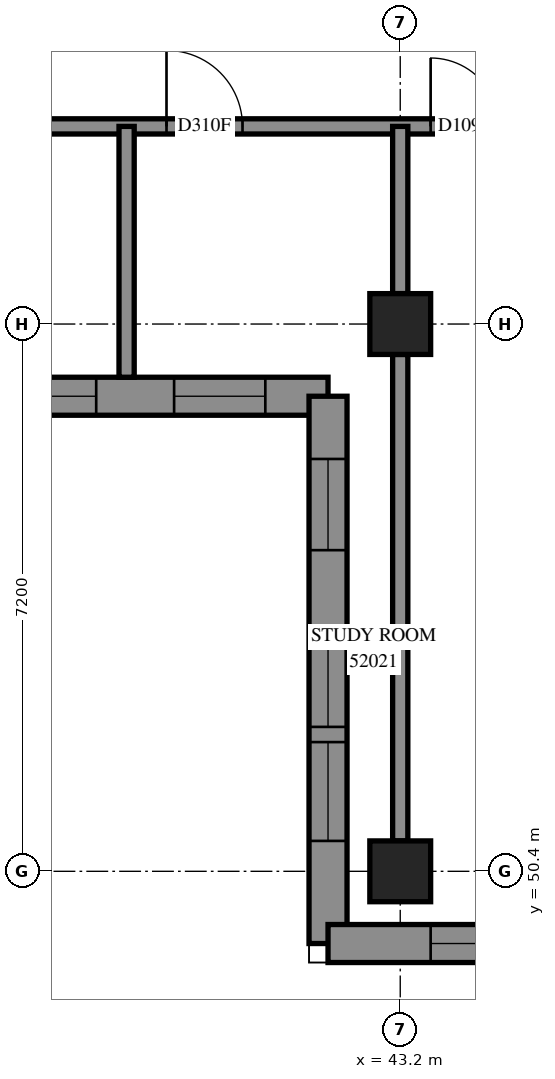
"""IFC4 building model, lengths in metres.
Left out: names, types, materials, properties, quantities, classifications, styles, units other than length and angle.
Written with IfcOpenShell. Run it as: python <this file> out.ifc"""

import sys

from ifc_helpers import new_model, si_unit, direction, frame, frame_2d, origin, origin_2d, place, context, subcontext, project, spatial, polyline, rectangle, outline, extrude, element, fill, save


model = new_model("IFC4")
c1 = context("Model", 3, precision=1e-05, world=origin(), true_north=direction((0.0, 1.0)))
c2 = subcontext(c1, "Body", "Model", "MODEL_VIEW")
j1 = project(units=[si_unit("LENGTHUNIT", "METRE"), si_unit("PLANEANGLEUNIT", "RADIAN")], contexts=[c1])
p1 = place(None, origin())
s1 = spatial("IfcSite", under=j1, at=p1, CompositionType="ELEMENT")
p2 = place(p1, origin())
s2 = spatial("IfcBuilding", under=s1, at=p2, CompositionType="ELEMENT")
p3 = place(p2, frame((0.0, 0.0, 193.0)))
s3 = spatial("IfcBuildingStorey", under=s2, at=p3, CompositionType="ELEMENT", Elevation=193.0)
for number, where, z_axis, x_axis in (
    (1, (43.2, 50.4, 0.0), (0.0, 0.0, 1.0), (1.0, 0.0, 0.0)),
    (2, (43.2, 57.6, 0.0), (0.0, 0.0, 1.0), (1.0, 0.0, 0.0)),
):
    element("IfcColumn", number, at=place(p3, frame(where, z_axis=z_axis, x_axis=x_axis)), inside=s3, PredefinedType="COLUMN", context=c2, shape_type="SweptSolid", body=[
        extrude(rectangle(XDim=0.8, YDim=0.8, at=origin_2d()), origin(), (0.0, 0.0, 1.0), 3.1),
    ])
p4 = place(p3, frame((35.05, 56.65, 0.0), z_axis=(0.0, 0.0, 1.0), x_axis=(1.0, 0.0, 0.0)))
e3 = element("IfcWall", 3, at=p4, inside=s3, PredefinedType="SOLIDWALL", context=c2, shape_type="SweptSolid", body=[
    extrude(outline(polyline([(-0.25, -0.25), (6.95, -0.25), (7.45, 0.25), (0.25, 0.25), (-0.25, -0.25)])), origin(), (0.0, 0.0, 1.0), 3.1),
])
p5 = place(p4, frame((1.35, 0.0, 0.45)))
e4 = element("IfcOpeningElement", 4, at=p5, cuts=e3, PredefinedType="OPENING", context=c2, shape_type="SweptSolid", body=[
    extrude(rectangle(XDim=1.3, YDim=2.5, at=frame_2d((0.65, 1.25))), frame((0.0, 0.26, 0.0), z_axis=(0.0, -1.0, 0.0), x_axis=(1.0, 0.0, 0.0)), (0.0, 0.0, 1.0), 0.52),
])
p6 = place(p4, frame((2.85, 0.0, 0.45)))
e5 = element("IfcOpeningElement", 5, at=p6, cuts=e3, PredefinedType="OPENING", context=c2, shape_type="SweptSolid", body=[
    extrude(rectangle(XDim=1.3, YDim=2.5, at=frame_2d((0.65, 1.25))), frame((0.0, 0.26, 0.0), z_axis=(0.0, -1.0, 0.0), x_axis=(1.0, 0.0, 0.0)), (0.0, 0.0, 1.0), 0.52),
])
p7 = place(p4, frame((5.175, 0.0, 0.45)))
e6 = element("IfcOpeningElement", 6, at=p7, cuts=e3, PredefinedType="OPENING", context=c2, shape_type="SweptSolid", body=[
    extrude(rectangle(XDim=1.2, YDim=2.5, at=frame_2d((0.6, 1.25))), frame((0.0, 0.26, 0.0), z_axis=(0.0, -1.0, 0.0), x_axis=(1.0, 0.0, 0.0)), (0.0, 0.0, 1.0), 0.52),
])
p8 = place(p3, frame((42.25, 56.65, 0.0), z_axis=(0.0, 0.0, 1.0), x_axis=(0.0, -1.0, 0.0)))
e7 = element("IfcWall", 7, at=p8, inside=s3, PredefinedType="SOLIDWALL", context=c2, shape_type="SweptSolid", body=[
    extrude(outline(polyline([(0.25, -0.25), (7.45, -0.25), (6.95, 0.25), (-0.25, 0.25), (0.25, -0.25)])), origin(), (0.0, 0.0, 1.0), 3.1),
])
p9 = place(p8, frame((3.05, 0.0, 0.45)))
e8 = element("IfcOpeningElement", 8, at=p9, cuts=e7, PredefinedType="OPENING", context=c2, shape_type="SweptSolid", body=[
    extrude(rectangle(XDim=1.3, YDim=2.5, at=frame_2d((0.65, 1.25))), frame((0.0, 0.26, 0.0), z_axis=(0.0, -1.0, 0.0), x_axis=(1.0, 0.0, 0.0)), (0.0, 0.0, 1.0), 0.52),
])
p10 = place(p8, frame((4.55, 0.0, 0.45)))
e9 = element("IfcOpeningElement", 9, at=p10, cuts=e7, PredefinedType="OPENING", context=c2, shape_type="SweptSolid", body=[
    extrude(rectangle(XDim=1.3, YDim=2.5, at=frame_2d((0.65, 1.25))), frame((0.0, 0.26, 0.0), z_axis=(0.0, -1.0, 0.0), x_axis=(1.0, 0.0, 0.0)), (0.0, 0.0, 1.0), 0.52),
])
p11 = place(p8, frame((0.825, 0.0, 0.45)))
e10 = element("IfcOpeningElement", 10, at=p11, cuts=e7, PredefinedType="OPENING", context=c2, shape_type="SweptSolid", body=[
    extrude(rectangle(XDim=1.2, YDim=2.5, at=frame_2d((0.6, 1.25))), frame((0.0, 0.26, 0.0), z_axis=(0.0, -1.0, 0.0), x_axis=(1.0, 0.0, 0.0)), (0.0, 0.0, 1.0), 0.52),
])
p12 = place(p3, frame((42.25, 49.45, 0.0), z_axis=(0.0, 0.0, 1.0), x_axis=(1.0, 0.0, 0.0)))
e11 = element("IfcWall", 11, at=p12, inside=s3, PredefinedType="SOLIDWALL", context=c2, shape_type="SweptSolid", body=[
    extrude(outline(polyline([(-0.25, -0.25), (6.95, -0.25), (7.45, 0.25), (0.25, 0.25), (-0.25, -0.25)])), origin(), (0.0, 0.0, 1.0), 3.1),
])
p13 = place(p12, frame((1.35, 0.0, 0.45)))
e12 = element("IfcOpeningElement", 12, at=p13, cuts=e11, PredefinedType="OPENING", context=c2, shape_type="SweptSolid", body=[
    extrude(rectangle(XDim=1.3, YDim=2.5, at=frame_2d((0.65, 1.25))), frame((0.0, 0.26, 0.0), z_axis=(0.0, -1.0, 0.0), x_axis=(1.0, 0.0, 0.0)), (0.0, 0.0, 1.0), 0.52),
])
p14 = place(p12, frame((2.85, 0.0, 0.45)))
e13 = element("IfcOpeningElement", 13, at=p14, cuts=e11, PredefinedType="OPENING", context=c2, shape_type="SweptSolid", body=[
    extrude(rectangle(XDim=1.3, YDim=2.5, at=frame_2d((0.65, 1.25))), frame((0.0, 0.26, 0.0), z_axis=(0.0, -1.0, 0.0), x_axis=(1.0, 0.0, 0.0)), (0.0, 0.0, 1.0), 0.52),
])
p15 = place(p12, frame((5.175, 0.0, 0.45)))
e14 = element("IfcOpeningElement", 14, at=p15, cuts=e11, PredefinedType="OPENING", context=c2, shape_type="SweptSolid", body=[
    extrude(rectangle(XDim=1.2, YDim=2.5, at=frame_2d((0.6, 1.25))), frame((0.0, 0.26, 0.0), z_axis=(0.0, -1.0, 0.0), x_axis=(1.0, 0.0, 0.0)), (0.0, 0.0, 1.0), 0.52),
])
p16 = place(p3, frame((36.0, 60.2, 0.0), z_axis=(0.0, 0.0, 1.0), x_axis=(1.0, 0.0, 0.0)))
e15 = element("IfcWall", 15, at=p16, inside=s3, PredefinedType="PARTITIONING", context=c2, shape_type="SweptSolid", body=[
    extrude(rectangle(XDim=17.0, YDim=0.2, at=frame_2d((8.5, 0.0))), origin(), (0.0, 0.0, 1.0), 3.1),
])
p17 = place(p16, frame((4.125, 0.0, 0.0)))
e16 = element("IfcOpeningElement", 16, at=p17, cuts=e15, PredefinedType="OPENING", context=c2, shape_type="SweptSolid", body=[
    extrude(rectangle(XDim=1.0, YDim=2.1, at=frame_2d((0.5, 1.05))), frame((0.0, 0.11, 0.0), z_axis=(0.0, -1.0, 0.0), x_axis=(1.0, 0.0, 0.0)), (0.0, 0.0, 1.0), 0.22),
])
p18 = place(p16, frame((7.6, 0.0, 0.0)))
e17 = element("IfcOpeningElement", 17, at=p18, cuts=e15, PredefinedType="OPENING", context=c2, shape_type="SweptSolid", body=[
    extrude(rectangle(XDim=0.9, YDim=2.1, at=frame_2d((0.45, 1.05))), frame((0.0, 0.11, 0.0), z_axis=(0.0, -1.0, 0.0), x_axis=(1.0, 0.0, 0.0)), (0.0, 0.0, 1.0), 0.22),
])
p19 = place(p16, frame((11.48, 0.0, 0.0)))
e18 = element("IfcOpeningElement", 18, at=p19, cuts=e15, PredefinedType="OPENING", context=c2, shape_type="SweptSolid", body=[
    extrude(rectangle(XDim=1.0, YDim=2.1, at=frame_2d((0.5, 1.05))), frame((0.0, 0.11, 0.0), z_axis=(0.0, -1.0, 0.0), x_axis=(1.0, 0.0, 0.0)), (0.0, 0.0, 1.0), 0.22),
])
p20 = place(p16, frame((15.805, 0.0, 0.0)))
e19 = element("IfcOpeningElement", 19, at=p20, cuts=e15, PredefinedType="OPENING", context=c2, shape_type="SweptSolid", body=[
    extrude(rectangle(XDim=1.0, YDim=2.1, at=frame_2d((0.5, 1.05))), frame((0.0, 0.11, 0.0), z_axis=(0.0, -1.0, 0.0), x_axis=(1.0, 0.0, 0.0)), (0.0, 0.0, 1.0), 0.22),
])
p21 = place(p3, frame((43.2, 50.8, 0.0), z_axis=(0.0, 0.0, 1.0), x_axis=(0.0, 1.0, 0.0)))
e20 = element("IfcWall", 20, at=p21, inside=s3, PredefinedType="PARTITIONING", context=c2, shape_type="SweptSolid", body=[
    extrude(rectangle(XDim=6.4, YDim=0.2, at=frame_2d((3.2, 0.0))), origin(), (0.0, 0.0, 1.0), 2.6),
])
p22 = place(p3, frame((39.6, 56.9, 0.0), z_axis=(0.0, 0.0, 1.0), x_axis=(0.0, 1.0, 0.0)))
e21 = element("IfcWall", 21, at=p22, inside=s3, PredefinedType="PARTITIONING", context=c2, shape_type="SweptSolid", body=[
    extrude(rectangle(XDim=3.3, YDim=0.2, at=frame_2d((1.65, 0.0))), origin(), (0.0, 0.0, 1.0), 3.1),
])
p23 = place(p3, frame((43.2, 58.0, 0.0), z_axis=(0.0, 0.0, 1.0), x_axis=(0.0, 1.0, 0.0)))
e22 = element("IfcWall", 22, at=p23, inside=s3, PredefinedType="PARTITIONING", context=c2, shape_type="SweptSolid", body=[
    extrude(rectangle(XDim=2.2, YDim=0.2, at=frame_2d((1.1, 0.0))), origin(), (0.0, 0.0, 1.0), 3.1),
])
p24 = place(p6, origin())
e23 = element("IfcWindow", 23, at=p24, inside=s3, PartitioningType="SINGLE_PANEL", PredefinedType="WINDOW", context=c2, shape_type="SweptSolid", body=[
    extrude(rectangle(XDim=1.3, YDim=2.5, at=frame_2d((0.65, 1.25))), frame((0.0, 0.18, 0.0), z_axis=(0.0, -1.0, 0.0), x_axis=(1.0, 0.0, 0.0)), (0.0, 0.0, 1.0), 0.06),
])
fill(e5, e23)
p25 = place(p7, origin())
e24 = element("IfcWindow", 24, at=p25, inside=s3, PartitioningType="SINGLE_PANEL", PredefinedType="WINDOW", context=c2, shape_type="SweptSolid", body=[
    extrude(rectangle(XDim=1.2, YDim=2.5, at=frame_2d((0.6, 1.25))), frame((0.0, 0.18, 0.0), z_axis=(0.0, -1.0, 0.0), x_axis=(1.0, 0.0, 0.0)), (0.0, 0.0, 1.0), 0.06),
])
fill(e6, e24)
p26 = place(p9, origin())
e25 = element("IfcWindow", 25, at=p26, inside=s3, PartitioningType="SINGLE_PANEL", PredefinedType="WINDOW", context=c2, shape_type="SweptSolid", body=[
    extrude(rectangle(XDim=1.3, YDim=2.5, at=frame_2d((0.65, 1.25))), frame((0.0, 0.18, 0.0), z_axis=(0.0, -1.0, 0.0), x_axis=(1.0, 0.0, 0.0)), (0.0, 0.0, 1.0), 0.06),
])
fill(e8, e25)
p27 = place(p10, origin())
e26 = element("IfcWindow", 26, at=p27, inside=s3, PartitioningType="SINGLE_PANEL", PredefinedType="WINDOW", context=c2, shape_type="SweptSolid", body=[
    extrude(rectangle(XDim=1.3, YDim=2.5, at=frame_2d((0.65, 1.25))), frame((0.0, 0.18, 0.0), z_axis=(0.0, -1.0, 0.0), x_axis=(1.0, 0.0, 0.0)), (0.0, 0.0, 1.0), 0.06),
])
fill(e9, e26)
p28 = place(p11, origin())
e27 = element("IfcWindow", 27, at=p28, inside=s3, PartitioningType="SINGLE_PANEL", PredefinedType="WINDOW", context=c2, shape_type="SweptSolid", body=[
    extrude(rectangle(XDim=1.2, YDim=2.5, at=frame_2d((0.6, 1.25))), frame((0.0, 0.18, 0.0), z_axis=(0.0, -1.0, 0.0), x_axis=(1.0, 0.0, 0.0)), (0.0, 0.0, 1.0), 0.06),
])
fill(e10, e27)
p29 = place(p13, origin())
e28 = element("IfcWindow", 28, at=p29, inside=s3, PartitioningType="SINGLE_PANEL", PredefinedType="WINDOW", context=c2, shape_type="SweptSolid", body=[
    extrude(rectangle(XDim=1.3, YDim=2.5, at=frame_2d((0.65, 1.25))), frame((0.0, 0.18, 0.0), z_axis=(0.0, -1.0, 0.0), x_axis=(1.0, 0.0, 0.0)), (0.0, 0.0, 1.0), 0.06),
])
fill(e12, e28)
p30 = place(p17, origin())
e29 = element("IfcDoor", 29, at=p30, inside=s3, OperationType="SINGLE_SWING_RIGHT", PredefinedType="DOOR", context=c2, shape_type="SweptSolid", body=[
    extrude(rectangle(XDim=1.0, YDim=2.1, at=frame_2d((0.5, 1.05))), frame((0.0, 0.025, 0.0), z_axis=(0.0, -1.0, 0.0), x_axis=(1.0, 0.0, 0.0)), (0.0, 0.0, 1.0), 0.05),
])
fill(e16, e29)
p31 = place(p18, origin())
e30 = element("IfcDoor", 30, at=p31, inside=s3, OperationType="SINGLE_SWING_LEFT", PredefinedType="DOOR", context=c2, shape_type="SweptSolid", body=[
    extrude(rectangle(XDim=0.9, YDim=2.1, at=frame_2d((0.45, 1.05))), frame((0.0, 0.025, 0.0), z_axis=(0.0, -1.0, 0.0), x_axis=(1.0, 0.0, 0.0)), (0.0, 0.0, 1.0), 0.05),
])
fill(e17, e30)
save(model, sys.argv[1])
